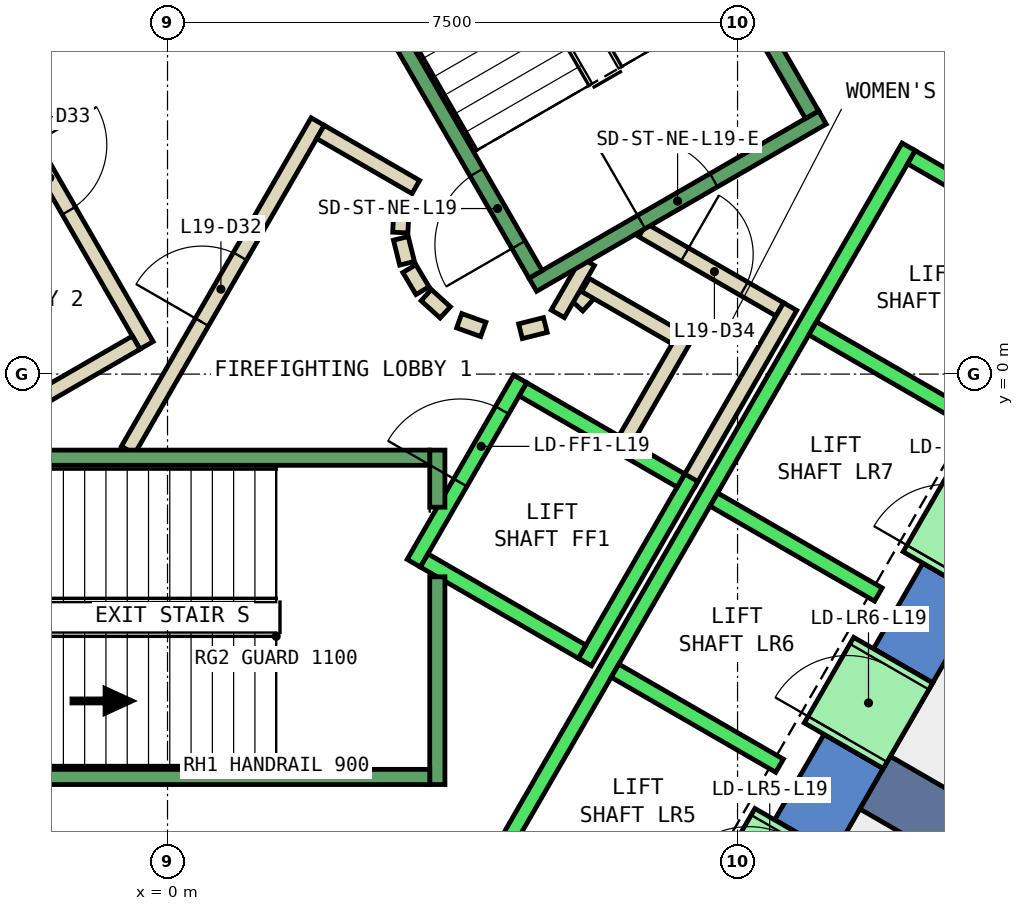
"""IFC4 building model, lengths in metres.
Left out: names, types, materials, properties, quantities, classifications, styles, units other than length and angle.
Written with IfcOpenShell. Run it as: python <this file> out.ifc"""

import sys

from ifc_helpers import new_model, si_unit, direction, frame, frame_2d, origin, place, context, subcontext, project, spatial, polyline, rectangle, outline, extrude, element, fill, save


model = new_model("IFC4")
c1 = context("Model", 3, precision=1e-05, world=origin(), true_north=direction((0.0, 1.0)))
c2 = subcontext(c1, "Body", "Model", "MODEL_VIEW")
j1 = project(units=[si_unit("LENGTHUNIT", "METRE"), si_unit("PLANEANGLEUNIT", "RADIAN")], contexts=[c1])
p1 = place(None, origin())
s1 = spatial("IfcSite", under=j1, at=p1, CompositionType="ELEMENT")
p2 = place(p1, origin())
s2 = spatial("IfcBuilding", under=s1, at=p2, CompositionType="ELEMENT")
p3 = place(p2, frame((0.0, 0.0, 90.8)))
s3 = spatial("IfcBuildingStorey", under=s2, at=p3, CompositionType="ELEMENT", Elevation=90.8)
p4 = place(p3, frame((0.0, 0.0, -0.4)))
e1 = element("IfcWall", 1, at=p4, inside=s3, PredefinedType="SHEAR", context=c2, shape_type="SweptSolid", body=[
    extrude(outline(polyline([(8.517, 11.748), (7.738, 11.298), (12.817, 2.5), (13.856, 2.5), (8.517, 11.748)])), origin(), (0.0, 0.0, 1.0), 4.2),
])
p5 = place(p3, frame((0.0, 0.0, -0.4)))
e2 = element("IfcWall", 2, at=p5, inside=s3, PredefinedType="SHEAR", context=c2, shape_type="SweptSolid", body=[
    extrude(outline(polyline([(9.417, -5.189), (8.638, -4.739), (7.988, -5.864), (8.767, -6.314), (9.417, -5.189)])), origin(), (0.0, 0.0, 1.0), 4.2),
])
p6 = place(p3, frame((0.0, 0.0, -0.4)))
e3 = element("IfcWall", 3, at=p6, inside=s3, PredefinedType="SHEAR", context=c2, shape_type="SweptSolid", body=[
    extrude(outline(polyline([(10.717, -2.937), (9.938, -2.487), (9.288, -3.613), (10.067, -4.063), (10.717, -2.937)])), origin(), (0.0, 0.0, 1.0), 4.2),
])
p7 = place(p3, frame((0.0, 0.0, 3.6)))
e4 = element("IfcWall", 4, at=p7, inside=s3, PredefinedType="SHEAR", context=c2, shape_type="SweptSolid", body=[
    extrude(outline(polyline([(8.767, -6.314), (7.988, -5.864), (7.338, -6.99), (8.117, -7.44), (8.767, -6.314)])), origin(), (0.0, 0.0, 1.0), 0.2),
])
p8 = place(p3, frame((0.0, 0.0, 3.6)))
e5 = element("IfcWall", 5, at=p8, inside=s3, PredefinedType="SHEAR", context=c2, shape_type="SweptSolid", body=[
    extrude(outline(polyline([(10.067, -4.063), (9.288, -3.613), (8.638, -4.739), (9.417, -5.189), (10.067, -4.063)])), origin(), (0.0, 0.0, 1.0), 0.2),
])
p9 = place(p3, frame((0.0, 0.0, 3.6)))
e6 = element("IfcWall", 6, at=p9, inside=s3, PredefinedType="SHEAR", context=c2, shape_type="SweptSolid", body=[
    extrude(outline(polyline([(11.367, -1.811), (10.588, -1.361), (9.938, -2.487), (10.717, -2.937), (11.367, -1.811)])), origin(), (0.0, 0.0, 1.0), 0.2),
])
p10 = place(p3, frame((9.31, -5.375, -0.4), z_axis=(0.0, 0.0, 1.0), x_axis=(0.866017533419, -0.500013631625, 0.0)))
e7 = element("IfcWall", 7, at=p10, inside=s3, PredefinedType="SHEAR", context=c2, shape_type="SweptSolid", body=[
    extrude(rectangle(XDim=9.0, YDim=0.8, at=frame_2d((4.5, 0.0))), origin(), (0.0, 0.0, 1.0), 4.2),
])
p11 = place(p3, frame((5.39, 0.898, 0.0), z_axis=(0.0, 0.0, 1.0), x_axis=(0.673828488714, 0.738887791073, 0.0)))
e8 = element("IfcWall", 8, at=p11, inside=s3, PredefinedType="PARTITIONING", context=c2, shape_type="SweptSolid", body=[
    extrude(rectangle(XDim=0.263, YDim=0.2, at=frame_2d((0.131, 0.0))), origin(), (0.0, 0.0, 1.0), 3.8),
])
p12 = place(p3, frame((5.499, 1.172, 0.0), z_axis=(0.0, 0.0, 1.0), x_axis=(0.866333505267, -0.499465972466, 0.0)))
e9 = element("IfcWall", 9, at=p12, inside=s3, PredefinedType="PARTITIONING", context=c2, shape_type="SweptSolid", body=[
    extrude(rectangle(XDim=1.374, YDim=0.2, at=frame_2d((0.687, 0.0))), origin(), (0.0, 0.0, 1.0), 3.8),
])
p13 = place(p3, frame((6.826, 0.522, 0.0), z_axis=(0.0, 0.0, 1.0), x_axis=(-0.500016722714, -0.866015748706, 0.0)))
e10 = element("IfcWall", 10, at=p13, inside=s3, PredefinedType="PARTITIONING", context=c2, shape_type="SweptSolid", body=[
    extrude(rectangle(XDim=1.7, YDim=0.2, at=frame_2d((0.85, 0.0))), origin(), (0.0, 0.0, 1.0), 3.8),
])
p14 = place(p3, frame((6.25, 1.894, 0.0), z_axis=(0.0, 0.0, 1.0), x_axis=(0.866043184279, -0.499969202016, 0.0)))
e11 = element("IfcWall", 11, at=p14, inside=s3, PredefinedType="PARTITIONING", context=c2, shape_type="SweptSolid", body=[
    extrude(rectangle(XDim=2.084, YDim=0.2, at=frame_2d((1.042, 0.0))), origin(), (0.0, 0.0, 1.0), 3.8),
])
p15 = place(p14, frame((0.642, 0.0, 0.0)))
e12 = element("IfcOpeningElement", 12, at=p15, cuts=e11, PredefinedType="OPENING", context=c2, shape_type="SweptSolid", body=[
    extrude(rectangle(XDim=0.9, YDim=2.1, at=frame_2d((0.45, 1.05))), frame((0.0, 0.11, 0.0), z_axis=(0.0, -1.0, 0.0), x_axis=(1.0, 0.0, 0.0)), (0.0, 0.0, 1.0), 0.22),
])
p16 = place(p3, frame((8.192, 0.888, 0.0), z_axis=(0.0, 0.0, 1.0), x_axis=(-0.499940625693, -0.866059680843, 0.0)))
e13 = element("IfcWall", 13, at=p16, inside=s3, PredefinedType="PARTITIONING", context=c2, shape_type="SweptSolid", body=[
    extrude(rectangle(XDim=2.68, YDim=0.2, at=frame_2d((1.34, 0.0))), origin(), (0.0, 0.0, 1.0), 3.8),
])
p17 = place(p3, frame((5.135, 0.793, 0.0), z_axis=(0.0, 0.0, 1.0), x_axis=(0.499526442893, 0.866298639529, 0.0)))
e14 = element("IfcWall", 14, at=p17, inside=s3, PredefinedType="PARTITIONING", context=c2, shape_type="SweptSolid", body=[
    extrude(rectangle(XDim=0.791, YDim=0.2, at=frame_2d((0.396, 0.0))), origin(), (0.0, 0.0, 1.0), 3.8),
])
p18 = place(p3, frame((-0.52, -1.0, 0.0), z_axis=(0.0, 0.0, 1.0), x_axis=(0.50011622646, 0.865958290007, 0.0)))
e15 = element("IfcWall", 15, at=p18, inside=s3, PredefinedType="PARTITIONING", context=c2, shape_type="SweptSolid", body=[
    extrude(rectangle(XDim=4.991, YDim=0.2, at=frame_2d((2.496, 0.0))), origin(), (0.0, 0.0, 1.0), 3.8),
])
p19 = place(p18, frame((1.945, 0.0, 0.0)))
e16 = element("IfcOpeningElement", 16, at=p19, cuts=e15, PredefinedType="OPENING", context=c2, shape_type="SweptSolid", body=[
    extrude(rectangle(XDim=1.0, YDim=2.1, at=frame_2d((0.5, 1.05))), frame((0.0, 0.11, 0.0), z_axis=(0.0, -1.0, 0.0), x_axis=(1.0, 0.0, 0.0)), (0.0, 0.0, 1.0), 0.22),
])
p20 = place(p3, frame((2.012, 3.186, 0.0), z_axis=(0.0, 0.0, 1.0), x_axis=(0.865891012941, -0.500232699559, 0.0)))
e17 = element("IfcWall", 17, at=p20, inside=s3, PredefinedType="PARTITIONING", context=c2, shape_type="SweptSolid", body=[
    extrude(rectangle(XDim=1.449, YDim=0.2, at=frame_2d((0.725, 0.0))), origin(), (0.0, 0.0, 1.0), 3.8),
])
p21 = place(p3, frame((3.079, 2.199, 0.0), z_axis=(0.0, 0.0, 1.0), x_axis=(-0.047771483479, -0.998858290933, 0.0)))
e18 = element("IfcWall", 18, at=p21, inside=s3, PredefinedType="PARTITIONING", context=c2, shape_type="SweptSolid", body=[
    extrude(rectangle(XDim=0.337, YDim=0.2, at=frame_2d((0.169, 0.0))), origin(), (0.0, 0.0, 1.0), 3.8),
])
p22 = place(p3, frame((3.07, 1.786, 0.0), z_axis=(0.0, 0.0, 1.0), x_axis=(0.242705583207, -0.970099994784, 0.0)))
e19 = element("IfcWall", 19, at=p22, inside=s3, PredefinedType="PARTITIONING", context=c2, shape_type="SweptSolid", body=[
    extrude(rectangle(XDim=0.338, YDim=0.2, at=frame_2d((0.169, 0.0))), origin(), (0.0, 0.0, 1.0), 3.8),
])
for number, where, z_axis, x_axis in (
    (20, (3.182, 1.388, 0.0), (0.0, 0.0, 1.0), (0.512, -0.859, 0.0)),
    (21, (3.404, 1.039, 0.0), (0.0, 0.0, 1.0), (0.74, -0.672, 0.0)),
):
    element("IfcWall", number, at=place(p3, frame(where, z_axis=z_axis, x_axis=x_axis)), inside=s3, PredefinedType="PARTITIONING", context=c2, shape_type="SweptSolid", body=[
        extrude(rectangle(XDim=0.338, YDim=0.2, at=frame_2d((0.169, 0.0))), origin(), (0.0, 0.0, 1.0), 3.8),
    ])
p23 = place(p3, frame((3.838, 0.702, 0.0), z_axis=(0.0, 0.0, 1.0), x_axis=(0.941035081519, -0.338308993895, 0.0)))
e22 = element("IfcWall", 22, at=p23, inside=s3, PredefinedType="PARTITIONING", context=c2, shape_type="SweptSolid", body=[
    extrude(rectangle(XDim=0.337, YDim=0.2, at=frame_2d((0.168, 0.0))), origin(), (0.0, 0.0, 1.0), 3.8),
])
p24 = place(p3, frame((4.644, 0.564, 0.0), z_axis=(0.0, 0.0, 1.0), x_axis=(0.969929076366, 0.243387729394, 0.0)))
e23 = element("IfcWall", 23, at=p24, inside=s3, PredefinedType="PARTITIONING", context=c2, shape_type="SweptSolid", body=[
    extrude(rectangle(XDim=0.337, YDim=0.2, at=frame_2d((0.168, 0.0))), origin(), (0.0, 0.0, 1.0), 3.8),
])
p25 = place(p3, frame((-2.771, 4.7, 0.0), z_axis=(0.0, 0.0, 1.0), x_axis=(0.499969479948, -0.866043023828, 0.0)))
e24 = element("IfcWall", 24, at=p25, inside=s3, PredefinedType="PARTITIONING", context=c2, shape_type="SweptSolid", body=[
    extrude(rectangle(XDim=4.99, YDim=0.2, at=frame_2d((2.495, 0.0))), origin(), (0.0, 0.0, 1.0), 3.8),
])
p26 = place(p25, frame((1.945, 0.0, 0.0)))
e25 = element("IfcOpeningElement", 25, at=p26, cuts=e24, PredefinedType="OPENING", context=c2, shape_type="SweptSolid", body=[
    extrude(rectangle(XDim=1.0, YDim=2.1, at=frame_2d((0.5, 1.05))), frame((0.0, 0.11, 0.0), z_axis=(0.0, -1.0, 0.0), x_axis=(1.0, 0.0, 0.0)), (0.0, 0.0, 1.0), 0.22),
])
p27 = place(p3, frame((-0.412, 0.414, 0.0), z_axis=(0.0, 0.0, 1.0), x_axis=(-0.866017369001, -0.500013916395, 0.0)))
e26 = element("IfcWall", 26, at=p27, inside=s3, PredefinedType="PARTITIONING", context=c2, shape_type="SweptSolid", body=[
    extrude(rectangle(XDim=1.45, YDim=0.2, at=frame_2d((0.725, 0.0))), origin(), (0.0, 0.0, 1.0), 3.8),
])
p28 = place(p3, frame((3.24, -2.488, 0.0), z_axis=(0.0, 0.0, 1.0), x_axis=(0.49994636267, 0.866056369097, 0.0)))
e27 = element("IfcWall", 27, at=p28, inside=s3, PredefinedType="STANDARD", context=c2, shape_type="SweptSolid", body=[
    extrude(rectangle(XDim=2.8, YDim=0.2, at=frame_2d((1.4, 0.0))), origin(), (0.0, 0.0, 1.0), 3.8),
])
p29 = place(p28, frame((1.225, 0.0, 0.0)))
e28 = element("IfcOpeningElement", 28, at=p29, cuts=e27, PredefinedType="OPENING", context=c2, shape_type="SweptSolid", body=[
    extrude(rectangle(XDim=1.1, YDim=2.1, at=frame_2d((0.55, 1.05))), frame((0.0, 0.11, 0.0), z_axis=(0.0, -1.0, 0.0), x_axis=(1.0, 0.0, 0.0)), (0.0, 0.0, 1.0), 0.22),
])
p30 = place(p3, frame((5.492, -3.788, 0.0), z_axis=(0.0, 0.0, 1.0), x_axis=(0.500011755427, 0.866018616679, 0.0)))
e29 = element("IfcWall", 29, at=p30, inside=s3, PredefinedType="STANDARD", context=c2, shape_type="SweptSolid", body=[
    extrude(rectangle(XDim=2.8, YDim=0.2, at=frame_2d((1.4, 0.0))), origin(), (0.0, 0.0, 1.0), 3.8),
])
p31 = place(p3, frame((3.377, -2.452, 0.0), z_axis=(0.0, 0.0, 1.0), x_axis=(0.865955154139, -0.50012165622, 0.0)))
e30 = element("IfcWall", 30, at=p31, inside=s3, PredefinedType="STANDARD", context=c2, shape_type="SweptSolid", body=[
    extrude(rectangle(XDim=2.4, YDim=0.2, at=frame_2d((1.2, 0.0))), origin(), (0.0, 0.0, 1.0), 3.8),
])
p32 = place(p3, frame((4.677, -0.2, 0.0), z_axis=(0.0, 0.0, 1.0), x_axis=(0.865973769406, -0.500089422704, 0.0)))
e31 = element("IfcWall", 31, at=p32, inside=s3, PredefinedType="STANDARD", context=c2, shape_type="SweptSolid", body=[
    extrude(rectangle(XDim=2.399, YDim=0.2, at=frame_2d((1.2, 0.0))), origin(), (0.0, 0.0, 1.0), 3.8),
])
p33 = place(p3, frame((4.451, -6.19, 0.0), z_axis=(0.0, 0.0, 1.0), x_axis=(0.50000090737, 0.866024879913, 0.0)))
e32 = element("IfcWall", 32, at=p33, inside=s3, PredefinedType="STANDARD", context=c2, shape_type="SweptSolid", body=[
    extrude(rectangle(XDim=10.6, YDim=0.2, at=frame_2d((5.3, 0.0))), origin(), (0.0, 0.0, 1.0), 3.8),
])
for number, where, z_axis, x_axis in (
    (33, (5.888, -3.902, 0.0), (0.0, 0.0, 1.0), (0.866, -0.5, 0.0)),
    (34, (7.188, -1.65, 0.0), (0.0, 0.0, 1.0), (0.866, -0.5, 0.0)),
    (35, (8.488, 0.602, 0.0), (0.0, 0.0, 1.0), (0.866, -0.5, 0.0)),
):
    element("IfcWall", number, at=place(p3, frame(where, z_axis=z_axis, x_axis=x_axis)), inside=s3, PredefinedType="STANDARD", context=c2, shape_type="SweptSolid", body=[
        extrude(rectangle(XDim=2.5, YDim=0.2, at=frame_2d((1.25, 0.0))), origin(), (0.0, 0.0, 1.0), 3.8),
    ])
p34 = place(p3, frame((9.788, 2.853, 0.0), z_axis=(0.0, 0.0, 1.0), x_axis=(0.865998541277, -0.500046524342, 0.0)))
e36 = element("IfcWall", 36, at=p34, inside=s3, PredefinedType="STANDARD", context=c2, shape_type="SweptSolid", body=[
    extrude(rectangle(XDim=2.5, YDim=0.2, at=frame_2d((1.25, 0.0))), origin(), (0.0, 0.0, 1.0), 3.8),
])
p35 = place(p3, frame((7.598, -7.14, 0.0), z_axis=(0.0, 0.0, 1.0), x_axis=(0.500362116554, 0.865816234728, 0.0)))
e37 = element("IfcWall", 37, at=p35, inside=s3, PredefinedType="STANDARD", context=c2, shape_type="SweptSolid", body=[
    extrude(rectangle(XDim=1.299, YDim=1.2, at=frame_2d((0.65, 0.0))), origin(), (0.0, 0.0, 1.0), 2.4),
])
p36 = place(p35, frame((0.1, 0.0, 0.0)))
e38 = element("IfcOpeningElement", 38, at=p36, cuts=e37, PredefinedType="OPENING", context=c2, shape_type="SweptSolid", body=[
    extrude(rectangle(XDim=1.1, YDim=2.3, at=frame_2d((0.55, 1.15))), frame((0.0, 0.61, 0.0), z_axis=(0.0, -1.0, 0.0), x_axis=(1.0, 0.0, 0.0)), (0.0, 0.0, 1.0), 1.22),
])
p37 = place(p3, frame((8.898, -4.889, 0.0), z_axis=(0.0, 0.0, 1.0), x_axis=(0.500036693733, 0.866004217611, 0.0)))
e39 = element("IfcWall", 39, at=p37, inside=s3, PredefinedType="STANDARD", context=c2, shape_type="SweptSolid", body=[
    extrude(rectangle(XDim=1.3, YDim=1.2, at=frame_2d((0.65, 0.0))), origin(), (0.0, 0.0, 1.0), 2.4),
])
p38 = place(p37, frame((0.1, 0.0, 0.0)))
e40 = element("IfcOpeningElement", 40, at=p38, cuts=e39, PredefinedType="OPENING", context=c2, shape_type="SweptSolid", body=[
    extrude(rectangle(XDim=1.1, YDim=2.3, at=frame_2d((0.55, 1.15))), frame((0.0, 0.61, 0.0), z_axis=(0.0, -1.0, 0.0), x_axis=(1.0, 0.0, 0.0)), (0.0, 0.0, 1.0), 1.22),
])
p39 = place(p3, frame((10.198, -2.637, 0.0), z_axis=(0.0, 0.0, 1.0), x_axis=(0.49989585183, 0.866085525409, 0.0)))
e41 = element("IfcWall", 41, at=p39, inside=s3, PredefinedType="STANDARD", context=c2, shape_type="SweptSolid", body=[
    extrude(rectangle(XDim=1.3, YDim=1.2, at=frame_2d((0.65, 0.0))), origin(), (0.0, 0.0, 1.0), 2.4),
])
p40 = place(p39, frame((0.1, 0.0, 0.0)))
e42 = element("IfcOpeningElement", 42, at=p40, cuts=e41, PredefinedType="OPENING", context=c2, shape_type="SweptSolid", body=[
    extrude(rectangle(XDim=1.1, YDim=2.3, at=frame_2d((0.55, 1.15))), frame((0.0, 0.61, 0.0), z_axis=(0.0, -1.0, 0.0), x_axis=(1.0, 0.0, 0.0)), (0.0, 0.0, 1.0), 1.22),
])
p41 = place(p3, frame((3.55, -2.667, 0.0), z_axis=(0.0, 0.0, 1.0), x_axis=(0.0, -1.0, 0.0)))
e43 = element("IfcWall", 43, at=p41, inside=s3, PredefinedType="STANDARD", context=c2, shape_type="SweptSolid", body=[
    extrude(rectangle(XDim=2.733, YDim=0.2, at=frame_2d((1.366, 0.0))), origin(), (0.0, 0.0, 1.0), 3.8),
])
p42 = place(p3, frame((3.55, -1.0, 0.0), z_axis=(0.0, 0.0, 1.0), x_axis=(0.0, -1.0, 0.0)))
e44 = element("IfcWall", 44, at=p42, inside=s3, PredefinedType="STANDARD", context=c2, shape_type="SweptSolid", body=[
    extrude(rectangle(XDim=0.751, YDim=0.2, at=frame_2d((0.375, 0.0))), origin(), (0.0, 0.0, 1.0), 3.8),
])
p43 = place(p3, frame((-3.45, -1.1, 0.0), z_axis=(0.0, 0.0, 1.0), x_axis=(1.0, 0.0, 0.0)))
e45 = element("IfcWall", 45, at=p43, inside=s3, PredefinedType="STANDARD", context=c2, shape_type="SweptSolid", body=[
    extrude(rectangle(XDim=6.9, YDim=0.2, at=frame_2d((3.45, 0.0))), origin(), (0.0, 0.0, 1.0), 3.8),
])
p44 = place(p43, frame((0.45, 0.0, 0.0)))
e46 = element("IfcOpeningElement", 46, at=p44, cuts=e45, PredefinedType="OPENING", context=c2, shape_type="SweptSolid", body=[
    extrude(rectangle(XDim=1.1, YDim=2.2, at=frame_2d((0.55, 1.1))), frame((0.0, 0.11, 0.0), z_axis=(0.0, -1.0, 0.0), x_axis=(1.0, 0.0, 0.0)), (0.0, 0.0, 1.0), 0.22),
])
p45 = place(p3, frame((-3.45, -5.3, 0.0), z_axis=(0.0, 0.0, 1.0), x_axis=(1.0, 0.0, 0.0)))
e47 = element("IfcWall", 47, at=p45, inside=s3, PredefinedType="STANDARD", context=c2, shape_type="SweptSolid", body=[
    extrude(rectangle(XDim=6.9, YDim=0.2, at=frame_2d((3.45, 0.0))), origin(), (0.0, 0.0, 1.0), 3.8),
])
p46 = place(p3, frame((4.806, 1.176, 0.0), z_axis=(0.0, 0.0, 1.0), x_axis=(0.866059941101, 0.499940174841, 0.0)))
e48 = element("IfcWall", 48, at=p46, inside=s3, PredefinedType="STANDARD", context=c2, shape_type="SweptSolid", body=[
    extrude(rectangle(XDim=4.4, YDim=0.2, at=frame_2d((2.2, 0.0))), origin(), (0.0, 0.0, 1.0), 3.8),
])
p47 = place(p46, frame((1.65, 0.0, 0.0)))
e49 = element("IfcOpeningElement", 49, at=p47, cuts=e48, PredefinedType="OPENING", context=c2, shape_type="SweptSolid", body=[
    extrude(rectangle(XDim=1.1, YDim=2.2, at=frame_2d((0.55, 1.1))), frame((0.0, 0.11, 0.0), z_axis=(0.0, -1.0, 0.0), x_axis=(1.0, 0.0, 0.0)), (0.0, 0.0, 1.0), 0.22),
])
p48 = place(p3, frame((4.843, 1.312, 0.0), z_axis=(0.0, 0.0, 1.0), x_axis=(-0.499963383562, 0.866046543262, 0.0)))
e50 = element("IfcWall", 50, at=p48, inside=s3, PredefinedType="STANDARD", context=c2, shape_type="SweptSolid", body=[
    extrude(rectangle(XDim=6.9, YDim=0.2, at=frame_2d((3.45, 0.0))), origin(), (0.0, 0.0, 1.0), 3.8),
])
p49 = place(p48, frame((0.45, 0.0, 0.0)))
e51 = element("IfcOpeningElement", 51, at=p49, cuts=e50, PredefinedType="OPENING", context=c2, shape_type="SweptSolid", body=[
    extrude(rectangle(XDim=1.1, YDim=2.2, at=frame_2d((0.55, 1.1))), frame((0.0, 0.11, 0.0), z_axis=(0.0, -1.0, 0.0), x_axis=(1.0, 0.0, 0.0)), (0.0, 0.0, 1.0), 0.22),
])
p50 = place(p3, frame((8.48, 3.412, 0.0), z_axis=(0.0, 0.0, 1.0), x_axis=(-0.499978703459, 0.866037698999, 0.0)))
e52 = element("IfcWall", 52, at=p50, inside=s3, PredefinedType="STANDARD", context=c2, shape_type="SweptSolid", body=[
    extrude(rectangle(XDim=6.9, YDim=0.2, at=frame_2d((3.45, 0.0))), origin(), (0.0, 0.0, 1.0), 3.8),
])
p51 = place(p3, frame((-1.393, 7.288, 0.0), z_axis=(0.0, 0.0, 1.0), x_axis=(-0.499963383562, -0.866046543262, 0.0)))
e53 = element("IfcWall", 53, at=p51, inside=s3, PredefinedType="STANDARD", context=c2, shape_type="SweptSolid", body=[
    extrude(rectangle(XDim=6.9, YDim=0.2, at=frame_2d((3.45, 0.0))), origin(), (0.0, 0.0, 1.0), 3.8),
])
p52 = place(p51, frame((0.45, 0.0, 0.0)))
e54 = element("IfcOpeningElement", 54, at=p52, cuts=e53, PredefinedType="OPENING", context=c2, shape_type="SweptSolid", body=[
    extrude(rectangle(XDim=1.1, YDim=2.2, at=frame_2d((0.55, 1.1))), frame((0.0, 0.11, 0.0), z_axis=(0.0, -1.0, 0.0), x_axis=(1.0, 0.0, 0.0)), (0.0, 0.0, 1.0), 0.22),
])
p53 = place(p19, origin())
e55 = element("IfcDoor", 55, at=p53, inside=s3, OperationType="SINGLE_SWING_LEFT", PredefinedType="DOOR", context=c2, shape_type="SweptSolid", body=[
    extrude(rectangle(XDim=1.0, YDim=2.1, at=frame_2d((0.5, 1.05))), frame((0.0, 0.025, 0.0), z_axis=(0.0, -1.0, 0.0), x_axis=(1.0, 0.0, 0.0)), (0.0, 0.0, 1.0), 0.05),
])
fill(e16, e55)
p54 = place(p26, origin())
e56 = element("IfcDoor", 56, at=p54, inside=s3, OperationType="SINGLE_SWING_RIGHT", PredefinedType="DOOR", context=c2, shape_type="SweptSolid", body=[
    extrude(rectangle(XDim=1.0, YDim=2.1, at=frame_2d((0.5, 1.05))), frame((0.0, 0.025, 0.0), z_axis=(0.0, -1.0, 0.0), x_axis=(1.0, 0.0, 0.0)), (0.0, 0.0, 1.0), 0.05),
])
fill(e25, e56)
p55 = place(p15, origin())
e57 = element("IfcDoor", 57, at=p55, inside=s3, OperationType="SINGLE_SWING_LEFT", PredefinedType="DOOR", context=c2, shape_type="SweptSolid", body=[
    extrude(rectangle(XDim=0.9, YDim=2.1, at=frame_2d((0.45, 1.05))), frame((0.0, 0.025, 0.0), z_axis=(0.0, -1.0, 0.0), x_axis=(1.0, 0.0, 0.0)), (0.0, 0.0, 1.0), 0.05),
])
fill(e12, e57)
p56 = place(p38, origin())
e58 = element("IfcDoor", 58, at=p56, inside=s3, OperationType="SLIDING_TO_LEFT", PredefinedType="DOOR", context=c2, shape_type="SweptSolid", body=[
    extrude(rectangle(XDim=1.1, YDim=2.3, at=frame_2d((0.55, 1.15))), frame((0.0, 0.025, 0.0), z_axis=(0.0, -1.0, 0.0), x_axis=(1.0, 0.0, 0.0)), (0.0, 0.0, 1.0), 0.05),
])
fill(e40, e58)
p57 = place(p29, origin())
e59 = element("IfcDoor", 59, at=p57, inside=s3, OperationType="SLIDING_TO_LEFT", PredefinedType="DOOR", context=c2, shape_type="SweptSolid", body=[
    extrude(rectangle(XDim=1.1, YDim=2.1, at=frame_2d((0.55, 1.05))), frame((0.0, 0.025, 0.0), z_axis=(0.0, -1.0, 0.0), x_axis=(1.0, 0.0, 0.0)), (0.0, 0.0, 1.0), 0.05),
])
fill(e28, e59)
p58 = place(p49, origin())
e60 = element("IfcDoor", 60, at=p58, inside=s3, OperationType="SINGLE_SWING_LEFT", PredefinedType="DOOR", context=c2, shape_type="SweptSolid", body=[
    extrude(rectangle(XDim=1.1, YDim=2.2, at=frame_2d((0.55, 1.1))), frame((0.0, 0.025, 0.0), z_axis=(0.0, -1.0, 0.0), x_axis=(1.0, 0.0, 0.0)), (0.0, 0.0, 1.0), 0.05),
])
fill(e51, e60)
p59 = place(p47, origin())
e61 = element("IfcDoor", 61, at=p59, inside=s3, OperationType="SINGLE_SWING_LEFT", PredefinedType="DOOR", context=c2, shape_type="SweptSolid", body=[
    extrude(rectangle(XDim=1.1, YDim=2.2, at=frame_2d((0.55, 1.1))), frame((0.0, 0.025, 0.0), z_axis=(0.0, -1.0, 0.0), x_axis=(1.0, 0.0, 0.0)), (0.0, 0.0, 1.0), 0.05),
])
fill(e49, e61)
save(model, sys.argv[1])
